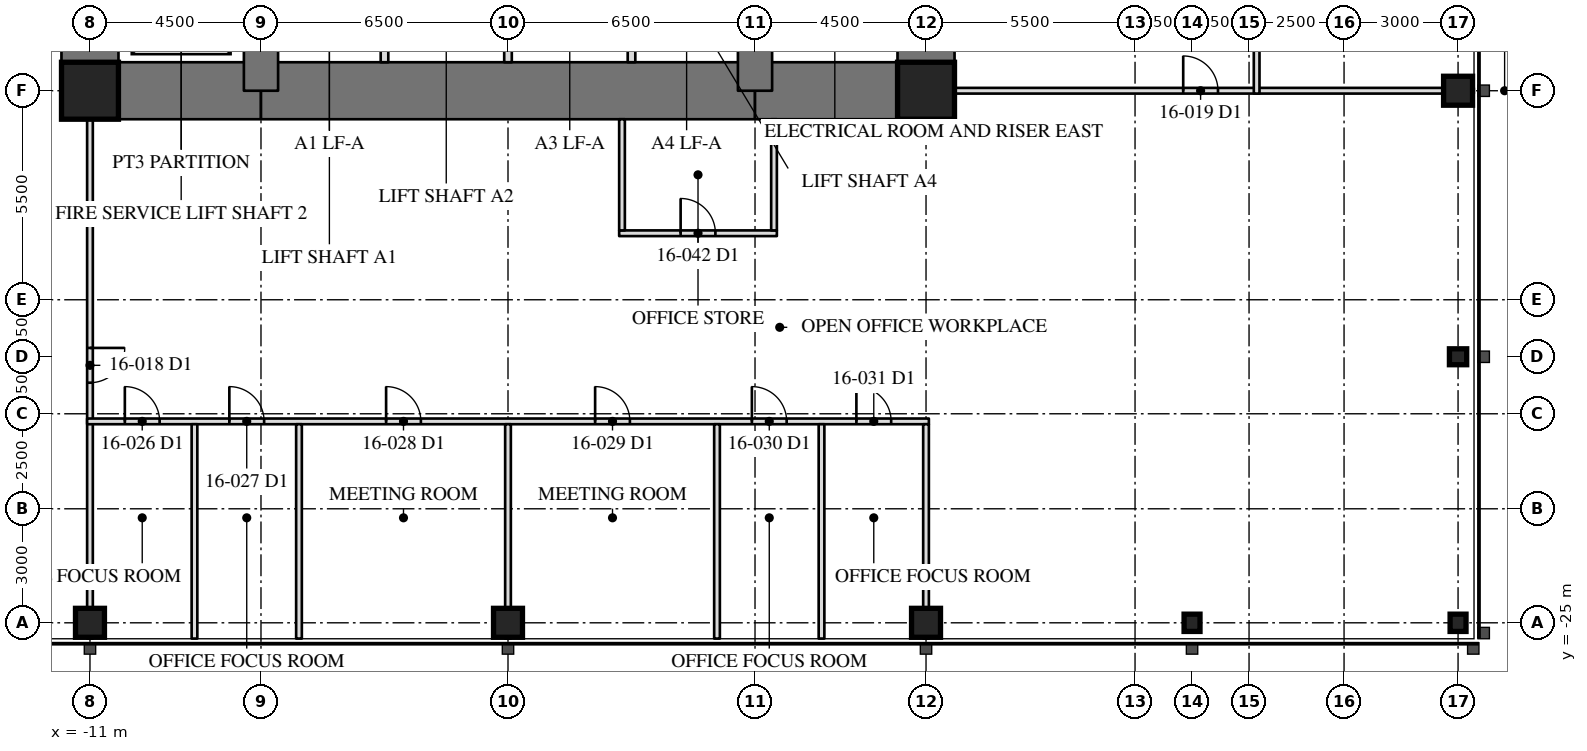
"""IFC4 building model, lengths in metres.
Left out: names, types, materials, properties, quantities, classifications, styles, units other than length and angle.
Written with IfcOpenShell. Run it as: python <this file> out.ifc"""

import sys

from ifc_helpers import new_model, si_unit, direction, frame, frame_2d, origin, origin_2d, place, context, subcontext, project, spatial, rectangle, hollow_rectangle, i_section, extrude, element, fill, save


model = new_model("IFC4")
c1 = context("Model", 3, precision=1e-05, world=origin(), true_north=direction((0.0, 1.0)))
c2 = subcontext(c1, "Body", "Model", "MODEL_VIEW")
j1 = project(units=[si_unit("LENGTHUNIT", "METRE"), si_unit("PLANEANGLEUNIT", "RADIAN")], contexts=[c1])
p1 = place(None, origin())
s1 = spatial("IfcSite", under=j1, at=p1, CompositionType="ELEMENT")
p2 = place(p1, origin())
s2 = spatial("IfcBuilding", under=s1, at=p2, CompositionType="ELEMENT")
p3 = place(p2, frame((0.0, 0.0, 69.3)))
s3 = spatial("IfcBuildingStorey", under=s2, at=p3, CompositionType="ELEMENT", Elevation=69.3)
for number, where, z_axis, x_axis in (
    (1, (-11.0, -25.0, 0.0), (0.0, 0.0, 1.0), (1.0, 0.0, 0.0)),
    (2, (0.0, -25.0, 0.0), (0.0, 0.0, 1.0), (1.0, 0.0, 0.0)),
    (3, (11.0, -25.0, 0.0), (0.0, 0.0, 1.0), (1.0, 0.0, 0.0)),
):
    element("IfcColumn", number, at=place(p3, frame(where, z_axis=z_axis, x_axis=x_axis)), inside=s3, PredefinedType="COLUMN", context=c2, shape_type="SweptSolid", body=[
        extrude(hollow_rectangle(XDim=0.762, YDim=0.762, WallThickness=0.127, at=origin_2d()), origin(), (0.0, 0.0, 1.0), 4.1),
    ])
for number, where, z_axis, x_axis in (
    (4, (18.0, -25.0, 0.0), (0.0, 0.0, 1.0), (1.0, 0.0, 0.0)),
    (5, (25.0, -25.0, 0.0), (0.0, 0.0, 1.0), (1.0, 0.0, 0.0)),
    (6, (25.0, -18.0, 0.0), (0.0, 0.0, 1.0), (0.0, 1.0, 0.0)),
):
    element("IfcColumn", number, at=place(p3, frame(where, z_axis=z_axis, x_axis=x_axis)), inside=s3, PredefinedType="COLUMN", context=c2, shape_type="SweptSolid", body=[
        extrude(i_section(OverallWidth=0.419, OverallDepth=0.455, WebThickness=0.042, FlangeThickness=0.068, at=origin_2d()), origin(), (0.0, 0.0, 1.0), 4.1),
    ])
p4 = place(p3, frame((25.0, -11.0, 0.0), z_axis=(0.0, 0.0, 1.0), x_axis=(0.0, 1.0, 0.0)))
e7 = element("IfcColumn", 7, at=p4, inside=s3, PredefinedType="COLUMN", context=c2, shape_type="SweptSolid", body=[
    extrude(hollow_rectangle(XDim=0.762, YDim=0.762, WallThickness=0.127, at=origin_2d()), origin(), (0.0, 0.0, 1.0), 4.1),
])
p5 = place(p3, frame((11.0, -11.0, 0.0), z_axis=(0.0, 0.0, 1.0), x_axis=(0.0, 1.0, 0.0)))
e8 = element("IfcWall", 8, at=p5, inside=s3, PredefinedType="SHEAR", context=c2, shape_type="SweptSolid", body=[
    extrude(rectangle(XDim=22.0, YDim=1.5, at=frame_2d((11.0, 0.0))), origin(), (0.0, 0.0, 1.0), 4.1),
])
p6 = place(p5, frame((15.393, 0.0, 0.0)))
e9 = element("IfcOpeningElement", 9, at=p6, cuts=e8, PredefinedType="OPENING", context=c2, shape_type="SweptSolid", body=[
    extrude(rectangle(XDim=0.915, YDim=2.134, at=frame_2d((0.458, 1.067))), frame((0.0, 0.76, 0.0), z_axis=(0.0, -1.0, 0.0), x_axis=(1.0, 0.0, 0.0)), (0.0, 0.0, 1.0), 1.52),
])
p7 = place(p3, frame((-11.0, 11.0, 0.0), z_axis=(0.0, 0.0, 1.0), x_axis=(0.0, -1.0, 0.0)))
e10 = element("IfcWall", 10, at=p7, inside=s3, PredefinedType="SHEAR", context=c2, shape_type="SweptSolid", body=[
    extrude(rectangle(XDim=22.0, YDim=1.5, at=frame_2d((11.0, 0.0))), origin(), (0.0, 0.0, 1.0), 4.1),
])
p8 = place(p7, frame((15.393, 0.0, 0.0)))
e11 = element("IfcOpeningElement", 11, at=p8, cuts=e10, PredefinedType="OPENING", context=c2, shape_type="SweptSolid", body=[
    extrude(rectangle(XDim=0.915, YDim=2.134, at=frame_2d((0.458, 1.067))), frame((0.0, 0.76, 0.0), z_axis=(0.0, -1.0, 0.0), x_axis=(1.0, 0.0, 0.0)), (0.0, 0.0, 1.0), 1.52),
])
p9 = place(p3, frame((-11.0, -11.0, 0.0), z_axis=(0.0, 0.0, 1.0), x_axis=(1.0, 0.0, 0.0)))
e12 = element("IfcWall", 12, at=p9, inside=s3, PredefinedType="SHEAR", context=c2, shape_type="SweptSolid", body=[
    extrude(rectangle(XDim=4.5, YDim=1.5, at=frame_2d((2.25, 0.0))), origin(), (0.0, 0.0, 1.0), 4.1),
])
p10 = place(p3, frame((-6.5, -11.0, 0.0), z_axis=(0.0, 0.0, 1.0), x_axis=(1.0, 0.0, 0.0)))
e13 = element("IfcWall", 13, at=p10, inside=s3, PredefinedType="SHEAR", context=c2, shape_type="SweptSolid", body=[
    extrude(rectangle(XDim=13.0, YDim=1.5, at=frame_2d((6.5, 0.0))), origin(), (0.0, 0.0, 1.0), 4.1),
])
p11 = place(p3, frame((6.5, -11.0, 0.0), z_axis=(0.0, 0.0, 1.0), x_axis=(1.0, 0.0, 0.0)))
e14 = element("IfcWall", 14, at=p11, inside=s3, PredefinedType="SHEAR", context=c2, shape_type="SweptSolid", body=[
    extrude(rectangle(XDim=4.5, YDim=1.5, at=frame_2d((2.25, 0.0))), origin(), (0.0, 0.0, 1.0), 4.1),
])
for number, where, z_axis, x_axis in (
    (15, (6.5, -11.0, 0.0), (0.0, 0.0, 1.0), (0.0, 1.0, 0.0)),
    (16, (-6.5, -6.5, 0.0), (0.0, 0.0, 1.0), (0.0, -1.0, 0.0)),
):
    element("IfcWall", number, at=place(p3, frame(where, z_axis=z_axis, x_axis=x_axis)), inside=s3, PredefinedType="SHEAR", context=c2, shape_type="SweptSolid", body=[
        extrude(rectangle(XDim=4.5, YDim=0.9, at=frame_2d((2.25, 0.0))), origin(), (0.0, 0.0, 1.0), 4.1),
    ])
for number, where, z_axis, x_axis in (
    (17, (-11.0, -11.0, 0.0), (0.0, 0.0, 1.0), (1.0, 0.0, 0.0)),
    (18, (11.0, -11.0, 0.0), (0.0, 0.0, 1.0), (1.0, 0.0, 0.0)),
):
    element("IfcColumn", number, at=place(p3, frame(where, z_axis=z_axis, x_axis=x_axis)), inside=s3, PredefinedType="COLUMN", context=c2, shape_type="SweptSolid", body=[
        extrude(hollow_rectangle(XDim=1.499, YDim=1.499, WallThickness=0.102, at=origin_2d()), origin(), (0.0, 0.0, 1.0), 4.1),
    ])
for number, where, z_axis, x_axis in (
    (19, (-3.25, -10.25, 0.0), (0.0, 0.0, 1.0), (0.0, 1.0, 0.0)),
    (20, (0.0, -10.25, 0.0), (0.0, 0.0, 1.0), (0.0, 1.0, 0.0)),
    (21, (3.25, -10.25, 0.0), (0.0, 0.0, 1.0), (0.0, 1.0, 0.0)),
):
    element("IfcWall", number, at=place(p3, frame(where, z_axis=z_axis, x_axis=x_axis)), inside=s3, PredefinedType="PARTITIONING", context=c2, shape_type="SweptSolid", body=[
        extrude(rectangle(XDim=3.3, YDim=0.2, at=frame_2d((1.65, 0.0))), origin(), (0.0, 0.0, 1.0), 3.91),
    ])
p12 = place(p3, frame((-11.0, -11.75, 0.0), z_axis=(0.0, 0.0, 1.0), x_axis=(0.0, -1.0, 0.0)))
e22 = element("IfcWall", 22, at=p12, inside=s3, PredefinedType="PARTITIONING", context=c2, shape_type="SweptSolid", body=[
    extrude(rectangle(XDim=13.665, YDim=0.15, at=frame_2d((6.833, 0.0))), origin(), (0.0, 0.0, 1.0), 3.13),
])
p13 = place(p12, frame((6.018, 0.0, 0.0)))
e23 = element("IfcOpeningElement", 23, at=p13, cuts=e22, PredefinedType="OPENING", context=c2, shape_type="SweptSolid", body=[
    extrude(rectangle(XDim=0.915, YDim=2.134, at=frame_2d((0.458, 1.067))), frame((0.0, 0.085, 0.0), z_axis=(0.0, -1.0, 0.0), x_axis=(1.0, 0.0, 0.0)), (0.0, 0.0, 1.0), 0.17),
])
p14 = place(p3, frame((11.75, -11.0, 0.0), z_axis=(0.0, 0.0, 1.0), x_axis=(1.0, 0.0, 0.0)))
e24 = element("IfcWall", 24, at=p14, inside=s3, PredefinedType="PARTITIONING", context=c2, shape_type="SweptSolid", body=[
    extrude(rectangle(XDim=13.665, YDim=0.15, at=frame_2d((6.833, 0.0))), origin(), (0.0, 0.0, 1.0), 3.13),
])
p15 = place(p14, frame((6.018, 0.0, 0.0)))
e25 = element("IfcOpeningElement", 25, at=p15, cuts=e24, PredefinedType="OPENING", context=c2, shape_type="SweptSolid", body=[
    extrude(rectangle(XDim=0.915, YDim=2.134, at=frame_2d((0.458, 1.067))), frame((0.0, 0.085, 0.0), z_axis=(0.0, -1.0, 0.0), x_axis=(1.0, 0.0, 0.0)), (0.0, 0.0, 1.0), 0.17),
])
p16 = place(p3, frame((-11.075, -19.7, 0.0), z_axis=(0.0, 0.0, 1.0), x_axis=(1.0, 0.0, 0.0)))
e26 = element("IfcWall", 26, at=p16, inside=s3, PredefinedType="PARTITIONING", context=c2, shape_type="SweptSolid", body=[
    extrude(rectangle(XDim=22.15, YDim=0.15, at=frame_2d((11.075, 0.0))), origin(), (0.0, 0.0, 1.0), 3.91),
])
p17 = place(p16, frame((0.992, 0.0, 0.0)))
e27 = element("IfcOpeningElement", 27, at=p17, cuts=e26, PredefinedType="OPENING", context=c2, shape_type="SweptSolid", body=[
    extrude(rectangle(XDim=0.915, YDim=2.134, at=frame_2d((0.458, 1.067))), frame((0.0, 0.085, 0.0), z_axis=(0.0, -1.0, 0.0), x_axis=(1.0, 0.0, 0.0)), (0.0, 0.0, 1.0), 0.17),
])
p18 = place(p16, frame((3.742, 0.0, 0.0)))
e28 = element("IfcOpeningElement", 28, at=p18, cuts=e26, PredefinedType="OPENING", context=c2, shape_type="SweptSolid", body=[
    extrude(rectangle(XDim=0.915, YDim=2.134, at=frame_2d((0.458, 1.067))), frame((0.0, 0.085, 0.0), z_axis=(0.0, -1.0, 0.0), x_axis=(1.0, 0.0, 0.0)), (0.0, 0.0, 1.0), 0.17),
])
p19 = place(p16, frame((7.867, 0.0, 0.0)))
e29 = element("IfcOpeningElement", 29, at=p19, cuts=e26, PredefinedType="OPENING", context=c2, shape_type="SweptSolid", body=[
    extrude(rectangle(XDim=0.915, YDim=2.134, at=frame_2d((0.458, 1.067))), frame((0.0, 0.085, 0.0), z_axis=(0.0, -1.0, 0.0), x_axis=(1.0, 0.0, 0.0)), (0.0, 0.0, 1.0), 0.17),
])
p20 = place(p16, frame((13.367, 0.0, 0.0)))
e30 = element("IfcOpeningElement", 30, at=p20, cuts=e26, PredefinedType="OPENING", context=c2, shape_type="SweptSolid", body=[
    extrude(rectangle(XDim=0.915, YDim=2.134, at=frame_2d((0.458, 1.067))), frame((0.0, 0.085, 0.0), z_axis=(0.0, -1.0, 0.0), x_axis=(1.0, 0.0, 0.0)), (0.0, 0.0, 1.0), 0.17),
])
p21 = place(p16, frame((17.492, 0.0, 0.0)))
e31 = element("IfcOpeningElement", 31, at=p21, cuts=e26, PredefinedType="OPENING", context=c2, shape_type="SweptSolid", body=[
    extrude(rectangle(XDim=0.915, YDim=2.134, at=frame_2d((0.458, 1.067))), frame((0.0, 0.085, 0.0), z_axis=(0.0, -1.0, 0.0), x_axis=(1.0, 0.0, 0.0)), (0.0, 0.0, 1.0), 0.17),
])
p22 = place(p16, frame((20.242, 0.0, 0.0)))
e32 = element("IfcOpeningElement", 32, at=p22, cuts=e26, PredefinedType="OPENING", context=c2, shape_type="SweptSolid", body=[
    extrude(rectangle(XDim=0.915, YDim=2.134, at=frame_2d((0.458, 1.067))), frame((0.0, 0.085, 0.0), z_axis=(0.0, -1.0, 0.0), x_axis=(1.0, 0.0, 0.0)), (0.0, 0.0, 1.0), 0.17),
])
for number, where, z_axis, x_axis in (
    (33, (-8.25, -19.775, 0.0), (0.0, 0.0, 1.0), (0.0, -1.0, 0.0)),
    (34, (-5.5, -19.775, 0.0), (0.0, 0.0, 1.0), (0.0, -1.0, 0.0)),
):
    element("IfcWall", number, at=place(p3, frame(where, z_axis=z_axis, x_axis=x_axis)), inside=s3, PredefinedType="PARTITIONING", context=c2, shape_type="SweptSolid", body=[
        extrude(rectangle(XDim=5.64, YDim=0.15, at=frame_2d((2.82, 0.0))), origin(), (0.0, 0.0, 1.0), 3.91),
    ])
p23 = place(p3, frame((0.0, -19.775, 0.0), z_axis=(0.0, 0.0, 1.0), x_axis=(0.0, -1.0, 0.0)))
e35 = element("IfcWall", 35, at=p23, inside=s3, PredefinedType="PARTITIONING", context=c2, shape_type="SweptSolid", body=[
    extrude(rectangle(XDim=5.64, YDim=0.15, at=frame_2d((2.82, 0.0))), origin(), (0.0, 0.0, 1.0), 3.13),
])
for number, where, z_axis, x_axis in (
    (36, (5.5, -19.775, 0.0), (0.0, 0.0, 1.0), (0.0, -1.0, 0.0)),
    (37, (8.25, -19.775, 0.0), (0.0, 0.0, 1.0), (0.0, -1.0, 0.0)),
):
    element("IfcWall", number, at=place(p3, frame(where, z_axis=z_axis, x_axis=x_axis)), inside=s3, PredefinedType="PARTITIONING", context=c2, shape_type="SweptSolid", body=[
        extrude(rectangle(XDim=5.64, YDim=0.15, at=frame_2d((2.82, 0.0))), origin(), (0.0, 0.0, 1.0), 3.91),
    ])
p24 = place(p3, frame((11.0, -19.775, 0.0), z_axis=(0.0, 0.0, 1.0), x_axis=(0.0, -1.0, 0.0)))
e38 = element("IfcWall", 38, at=p24, inside=s3, PredefinedType="PARTITIONING", context=c2, shape_type="SweptSolid", body=[
    extrude(rectangle(XDim=5.64, YDim=0.15, at=frame_2d((2.82, 0.0))), origin(), (0.0, 0.0, 1.0), 3.13),
])
p25 = place(p3, frame((19.7, -11.075, 0.0), z_axis=(0.0, 0.0, 1.0), x_axis=(0.0, 1.0, 0.0)))
e39 = element("IfcWall", 39, at=p25, inside=s3, PredefinedType="PARTITIONING", context=c2, shape_type="SweptSolid", body=[
    extrude(rectangle(XDim=22.15, YDim=0.15, at=frame_2d((11.075, 0.0))), origin(), (0.0, 0.0, 1.0), 3.91),
])
p26 = place(p25, frame((2.367, 0.0, 0.0)))
e40 = element("IfcOpeningElement", 40, at=p26, cuts=e39, PredefinedType="OPENING", context=c2, shape_type="SweptSolid", body=[
    extrude(rectangle(XDim=0.915, YDim=2.134, at=frame_2d((0.458, 1.067))), frame((0.0, 0.085, 0.0), z_axis=(0.0, -1.0, 0.0), x_axis=(1.0, 0.0, 0.0)), (0.0, 0.0, 1.0), 0.17),
])
p27 = place(p25, frame((7.867, 0.0, 0.0)))
e41 = element("IfcOpeningElement", 41, at=p27, cuts=e39, PredefinedType="OPENING", context=c2, shape_type="SweptSolid", body=[
    extrude(rectangle(XDim=0.915, YDim=2.134, at=frame_2d((0.458, 1.067))), frame((0.0, 0.085, 0.0), z_axis=(0.0, -1.0, 0.0), x_axis=(1.0, 0.0, 0.0)), (0.0, 0.0, 1.0), 0.17),
])
p28 = place(p25, frame((13.367, 0.0, 0.0)))
e42 = element("IfcOpeningElement", 42, at=p28, cuts=e39, PredefinedType="OPENING", context=c2, shape_type="SweptSolid", body=[
    extrude(rectangle(XDim=0.915, YDim=2.134, at=frame_2d((0.458, 1.067))), frame((0.0, 0.085, 0.0), z_axis=(0.0, -1.0, 0.0), x_axis=(1.0, 0.0, 0.0)), (0.0, 0.0, 1.0), 0.17),
])
p29 = place(p25, frame((18.867, 0.0, 0.0)))
e43 = element("IfcOpeningElement", 43, at=p29, cuts=e39, PredefinedType="OPENING", context=c2, shape_type="SweptSolid", body=[
    extrude(rectangle(XDim=0.915, YDim=2.134, at=frame_2d((0.458, 1.067))), frame((0.0, 0.085, 0.0), z_axis=(0.0, -1.0, 0.0), x_axis=(1.0, 0.0, 0.0)), (0.0, 0.0, 1.0), 0.17),
])
p30 = place(p3, frame((2.925, -14.75, 0.0), z_axis=(0.0, 0.0, 1.0), x_axis=(1.0, 0.0, 0.0)))
e44 = element("IfcWall", 44, at=p30, inside=s3, PredefinedType="PARTITIONING", context=c2, shape_type="SweptSolid", body=[
    extrude(rectangle(XDim=4.15, YDim=0.15, at=frame_2d((2.075, 0.0))), origin(), (0.0, 0.0, 1.0), 3.91),
])
p31 = place(p30, frame((1.617, 0.0, 0.0)))
e45 = element("IfcOpeningElement", 45, at=p31, cuts=e44, PredefinedType="OPENING", context=c2, shape_type="SweptSolid", body=[
    extrude(rectangle(XDim=0.915, YDim=2.134, at=frame_2d((0.458, 1.067))), frame((0.0, 0.085, 0.0), z_axis=(0.0, -1.0, 0.0), x_axis=(1.0, 0.0, 0.0)), (0.0, 0.0, 1.0), 0.17),
])
for number, where, z_axis, x_axis in (
    (46, (3.0, -14.675, 0.0), (0.0, 0.0, 1.0), (0.0, 1.0, 0.0)),
    (47, (7.0, -14.675, 0.0), (0.0, 0.0, 1.0), (0.0, 1.0, 0.0)),
):
    element("IfcWall", number, at=place(p3, frame(where, z_axis=z_axis, x_axis=x_axis)), inside=s3, PredefinedType="PARTITIONING", context=c2, shape_type="SweptSolid", body=[
        extrude(rectangle(XDim=2.925, YDim=0.15, at=frame_2d((1.462, 0.0))), origin(), (0.0, 0.0, 1.0), 3.91),
    ])
p32 = place(p13, origin())
e48 = element("IfcDoor", 48, at=p32, inside=s3, OperationType="SINGLE_SWING_LEFT", PredefinedType="DOOR", context=c2, shape_type="SweptSolid", body=[
    extrude(rectangle(XDim=0.915, YDim=2.134, at=frame_2d((0.458, 1.067))), frame((0.0, 0.025, 0.0), z_axis=(0.0, -1.0, 0.0), x_axis=(1.0, 0.0, 0.0)), (0.0, 0.0, 1.0), 0.05),
])
fill(e23, e48)
p33 = place(p15, origin())
e49 = element("IfcDoor", 49, at=p33, inside=s3, OperationType="SINGLE_SWING_LEFT", PredefinedType="DOOR", context=c2, shape_type="SweptSolid", body=[
    extrude(rectangle(XDim=0.915, YDim=2.134, at=frame_2d((0.458, 1.067))), frame((0.0, 0.025, 0.0), z_axis=(0.0, -1.0, 0.0), x_axis=(1.0, 0.0, 0.0)), (0.0, 0.0, 1.0), 0.05),
])
fill(e25, e49)
p34 = place(p17, origin())
e50 = element("IfcDoor", 50, at=p34, inside=s3, OperationType="SINGLE_SWING_LEFT", PredefinedType="DOOR", context=c2, shape_type="SweptSolid", body=[
    extrude(rectangle(XDim=0.915, YDim=2.134, at=frame_2d((0.458, 1.067))), frame((0.0, 0.025, 0.0), z_axis=(0.0, -1.0, 0.0), x_axis=(1.0, 0.0, 0.0)), (0.0, 0.0, 1.0), 0.05),
])
fill(e27, e50)
p35 = place(p18, origin())
e51 = element("IfcDoor", 51, at=p35, inside=s3, OperationType="SINGLE_SWING_LEFT", PredefinedType="DOOR", context=c2, shape_type="SweptSolid", body=[
    extrude(rectangle(XDim=0.915, YDim=2.134, at=frame_2d((0.458, 1.067))), frame((0.0, 0.025, 0.0), z_axis=(0.0, -1.0, 0.0), x_axis=(1.0, 0.0, 0.0)), (0.0, 0.0, 1.0), 0.05),
])
fill(e28, e51)
p36 = place(p19, origin())
e52 = element("IfcDoor", 52, at=p36, inside=s3, OperationType="SINGLE_SWING_LEFT", PredefinedType="DOOR", context=c2, shape_type="SweptSolid", body=[
    extrude(rectangle(XDim=0.915, YDim=2.134, at=frame_2d((0.458, 1.067))), frame((0.0, 0.025, 0.0), z_axis=(0.0, -1.0, 0.0), x_axis=(1.0, 0.0, 0.0)), (0.0, 0.0, 1.0), 0.05),
])
fill(e29, e52)
p37 = place(p20, origin())
e53 = element("IfcDoor", 53, at=p37, inside=s3, OperationType="SINGLE_SWING_LEFT", PredefinedType="DOOR", context=c2, shape_type="SweptSolid", body=[
    extrude(rectangle(XDim=0.915, YDim=2.134, at=frame_2d((0.458, 1.067))), frame((0.0, 0.025, 0.0), z_axis=(0.0, -1.0, 0.0), x_axis=(1.0, 0.0, 0.0)), (0.0, 0.0, 1.0), 0.05),
])
fill(e30, e53)
p38 = place(p21, origin())
e54 = element("IfcDoor", 54, at=p38, inside=s3, OperationType="SINGLE_SWING_LEFT", PredefinedType="DOOR", context=c2, shape_type="SweptSolid", body=[
    extrude(rectangle(XDim=0.915, YDim=2.134, at=frame_2d((0.458, 1.067))), frame((0.0, 0.025, 0.0), z_axis=(0.0, -1.0, 0.0), x_axis=(1.0, 0.0, 0.0)), (0.0, 0.0, 1.0), 0.05),
])
fill(e31, e54)
p39 = place(p22, origin())
e55 = element("IfcDoor", 55, at=p39, inside=s3, OperationType="SINGLE_SWING_LEFT", PredefinedType="DOOR", context=c2, shape_type="SweptSolid", body=[
    extrude(rectangle(XDim=0.915, YDim=2.134, at=frame_2d((0.458, 1.067))), frame((0.0, 0.025, 0.0), z_axis=(0.0, -1.0, 0.0), x_axis=(1.0, 0.0, 0.0)), (0.0, 0.0, 1.0), 0.05),
])
fill(e32, e55)
p40 = place(p31, origin())
e56 = element("IfcDoor", 56, at=p40, inside=s3, OperationType="SINGLE_SWING_LEFT", PredefinedType="DOOR", context=c2, shape_type="SweptSolid", body=[
    extrude(rectangle(XDim=0.915, YDim=2.134, at=frame_2d((0.458, 1.067))), frame((0.0, 0.025, 0.0), z_axis=(0.0, -1.0, 0.0), x_axis=(1.0, 0.0, 0.0)), (0.0, 0.0, 1.0), 0.05),
])
fill(e45, e56)
save(model, sys.argv[1])
